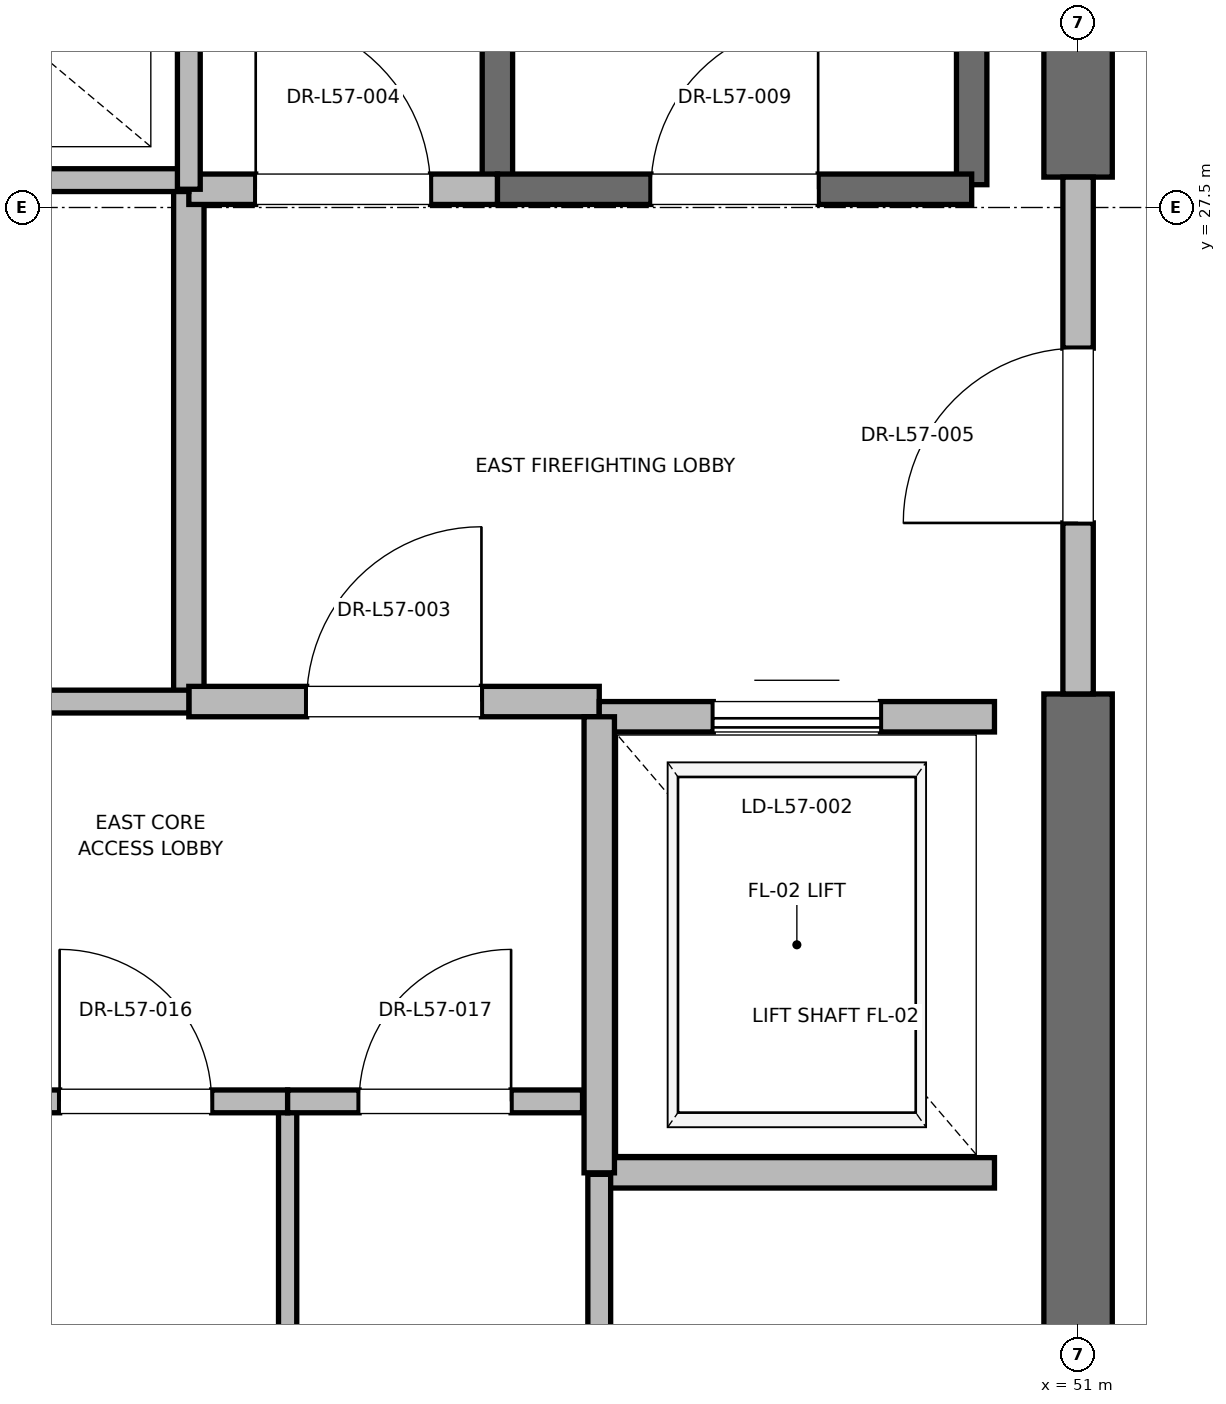
"""IFC4 building model, lengths in metres.
Left out: names, types, materials, properties, quantities, classifications, styles, units other than length and angle.
Written with IfcOpenShell. Run it as: python <this file> out.ifc"""

import sys

from ifc_helpers import new_model, si_unit, direction, frame, frame_2d, origin, place, context, subcontext, project, spatial, rectangle, extrude, element, fill, save


model = new_model("IFC4")
c1 = context("Model", 3, precision=1e-05, world=origin(), true_north=direction((0.0, 1.0)))
c2 = subcontext(c1, "Body", "Model", "MODEL_VIEW")
j1 = project(units=[si_unit("LENGTHUNIT", "METRE"), si_unit("PLANEANGLEUNIT", "RADIAN")], contexts=[c1])
p1 = place(None, origin())
s1 = spatial("IfcSite", under=j1, at=p1, CompositionType="ELEMENT")
p2 = place(p1, origin())
s2 = spatial("IfcBuilding", under=s1, at=p2, CompositionType="ELEMENT")
p3 = place(p2, frame((0.0, 0.0, 247.2)))
s3 = spatial("IfcBuildingStorey", under=s2, at=p3, CompositionType="ELEMENT", Elevation=247.2)
p4 = place(p3, frame((51.0, 18.5, 0.0), z_axis=(0.0, 0.0, 1.0), x_axis=(0.0, 1.0, 0.0)))
e1 = element("IfcWall", 1, at=p4, inside=s3, PredefinedType="SHEAR", context=c2, shape_type="SweptSolid", body=[
    extrude(rectangle(XDim=5.8, YDim=0.45, at=frame_2d((2.9, 0.0))), origin(), (0.0, 0.0, 1.0), 3.785),
])
p5 = place(p3, frame((51.0, 27.7, 0.0), z_axis=(0.0, 0.0, 1.0), x_axis=(0.0, 1.0, 0.0)))
e2 = element("IfcWall", 2, at=p5, inside=s3, PredefinedType="SHEAR", context=c2, shape_type="SweptSolid", body=[
    extrude(rectangle(XDim=8.8, YDim=0.45, at=frame_2d((4.4, 0.0))), origin(), (0.0, 0.0, 1.0), 3.785),
])
p6 = place(p3, frame((50.3, 27.65, 0.0), z_axis=(0.0, 0.0, 1.0), x_axis=(0.0, 1.0, 0.0)))
e3 = element("IfcWall", 3, at=p6, inside=s3, PredefinedType="SOLIDWALL", context=c2, shape_type="SweptSolid", body=[
    extrude(rectangle(XDim=8.15, YDim=0.2, at=frame_2d((4.075, 0.0))), origin(), (0.0, 0.0, 1.0), 3.785),
])
p7 = place(p3, frame((47.18, 27.62, 0.0), z_axis=(0.0, 0.0, 1.0), x_axis=(0.0, 1.0, 0.0)))
e4 = element("IfcWall", 4, at=p7, inside=s3, PredefinedType="SOLIDWALL", context=c2, shape_type="SweptSolid", body=[
    extrude(rectangle(XDim=8.18, YDim=0.2, at=frame_2d((4.09, 0.0))), origin(), (0.0, 0.0, 1.0), 3.785),
])
p8 = place(p3, frame((47.18, 27.62, 0.0), z_axis=(0.0, 0.0, 1.0), x_axis=(1.0, 0.0, 0.0)))
e5 = element("IfcWall", 5, at=p8, inside=s3, PredefinedType="SOLIDWALL", context=c2, shape_type="SweptSolid", body=[
    extrude(rectangle(XDim=3.12, YDim=0.2, at=frame_2d((1.56, 0.0))), origin(), (0.0, 0.0, 1.0), 3.785),
])
p9 = place(p8, frame((1.01, 0.0, 0.0)))
e6 = element("IfcOpeningElement", 6, at=p9, cuts=e5, PredefinedType="OPENING", context=c2, shape_type="SweptSolid", body=[
    extrude(rectangle(XDim=1.1, YDim=2.15, at=frame_2d((0.55, 1.075))), frame((0.0, 0.1, 0.0), z_axis=(0.0, -1.0, 0.0), x_axis=(1.0, 0.0, 0.0)), (0.0, 0.0, 1.0), 0.2),
])
p10 = place(p3, frame((45.15, 24.25, 0.0), z_axis=(0.0, 0.0, 1.0), x_axis=(0.0, 1.0, 0.0)))
e7 = element("IfcWall", 7, at=p10, inside=s3, PredefinedType="PARTITIONING", context=c2, shape_type="SweptSolid", body=[
    extrude(rectangle(XDim=3.37, YDim=0.2, at=frame_2d((1.685, 0.0))), origin(), (0.0, 0.0, 1.0), 3.785),
])
p11 = place(p3, frame((45.15, 24.25, 0.0), z_axis=(0.0, 0.0, 1.0), x_axis=(1.0, 0.0, 0.0)))
e8 = element("IfcWall", 8, at=p11, inside=s3, PredefinedType="PARTITIONING", context=c2, shape_type="SweptSolid", body=[
    extrude(rectangle(XDim=2.7, YDim=0.2, at=frame_2d((1.35, 0.0))), origin(), (0.0, 0.0, 1.0), 3.785),
])
p12 = place(p11, frame((0.775, 0.0, 0.0)))
e9 = element("IfcOpeningElement", 9, at=p12, cuts=e8, PredefinedType="OPENING", context=c2, shape_type="SweptSolid", body=[
    extrude(rectangle(XDim=1.15, YDim=2.2, at=frame_2d((0.575, 1.1))), frame((0.0, 0.1, 0.0), z_axis=(0.0, -1.0, 0.0), x_axis=(1.0, 0.0, 0.0)), (0.0, 0.0, 1.0), 0.2),
])
p13 = place(p3, frame((45.15, 27.62, 0.0), z_axis=(0.0, 0.0, 1.0), x_axis=(1.0, 0.0, 0.0)))
e10 = element("IfcWall", 10, at=p13, inside=s3, PredefinedType="PARTITIONING", context=c2, shape_type="SweptSolid", body=[
    extrude(rectangle(XDim=2.03, YDim=0.2, at=frame_2d((1.015, 0.0))), origin(), (0.0, 0.0, 1.0), 3.785),
])
p14 = place(p13, frame((0.44, 0.0, 0.0)))
e11 = element("IfcOpeningElement", 11, at=p14, cuts=e10, PredefinedType="OPENING", context=c2, shape_type="SweptSolid", body=[
    extrude(rectangle(XDim=1.15, YDim=2.2, at=frame_2d((0.575, 1.1))), frame((0.0, 0.1, 0.0), z_axis=(0.0, -1.0, 0.0), x_axis=(1.0, 0.0, 0.0)), (0.0, 0.0, 1.0), 0.2),
])
p15 = place(p3, frame((51.0, 24.3, 0.0), z_axis=(0.0, 0.0, 1.0), x_axis=(0.0, 1.0, 0.0)))
e12 = element("IfcWall", 12, at=p15, inside=s3, PredefinedType="PARTITIONING", context=c2, shape_type="SweptSolid", body=[
    extrude(rectangle(XDim=3.4, YDim=0.2, at=frame_2d((1.7, 0.0))), origin(), (0.0, 0.0, 1.0), 2.865),
])
p16 = place(p15, frame((1.125, 0.0, 0.0)))
e13 = element("IfcOpeningElement", 13, at=p16, cuts=e12, PredefinedType="OPENING", context=c2, shape_type="SweptSolid", body=[
    extrude(rectangle(XDim=1.15, YDim=2.2, at=frame_2d((0.575, 1.1))), frame((0.0, 0.1, 0.0), z_axis=(0.0, -1.0, 0.0), x_axis=(1.0, 0.0, 0.0)), (0.0, 0.0, 1.0), 0.2),
])
p17 = place(p3, frame((47.85, 21.15, 0.0), z_axis=(0.0, 0.0, 1.0), x_axis=(1.0, 0.0, 0.0)))
e14 = element("IfcWall", 14, at=p17, inside=s3, PredefinedType="SOLIDWALL", context=c2, shape_type="SweptSolid", body=[
    extrude(rectangle(XDim=2.6, YDim=0.2, at=frame_2d((1.3, 0.0))), origin(), (0.0, 0.0, 1.0), 3.785),
])
p18 = place(p3, frame((50.45, 24.15, 0.0), z_axis=(0.0, 0.0, 1.0), x_axis=(-1.0, 0.0, 0.0)))
e15 = element("IfcWall", 15, at=p18, inside=s3, PredefinedType="SOLIDWALL", context=c2, shape_type="SweptSolid", body=[
    extrude(rectangle(XDim=2.6, YDim=0.2, at=frame_2d((1.3, 0.0))), origin(), (0.0, 0.0, 1.0), 2.865),
])
p19 = place(p18, frame((0.75, 0.0, 0.0)))
e16 = element("IfcOpeningElement", 16, at=p19, cuts=e15, PredefinedType="OPENING", context=c2, shape_type="SweptSolid", body=[
    extrude(rectangle(XDim=1.1, YDim=2.2, at=frame_2d((0.55, 1.1))), frame((0.0, 0.1, 0.0), z_axis=(0.0, -1.0, 0.0), x_axis=(1.0, 0.0, 0.0)), (0.0, 0.0, 1.0), 0.2),
])
p20 = place(p3, frame((47.85, 24.15, 0.0), z_axis=(0.0, 0.0, 1.0), x_axis=(0.0, -1.0, 0.0)))
e17 = element("IfcWall", 17, at=p20, inside=s3, PredefinedType="SOLIDWALL", context=c2, shape_type="SweptSolid", body=[
    extrude(rectangle(XDim=3.0, YDim=0.2, at=frame_2d((1.5, 0.0))), origin(), (0.0, 0.0, 1.0), 3.785),
])
p21 = place(p3, frame((41.56, 27.68, 0.0), z_axis=(0.0, 0.0, 1.0), x_axis=(1.0, 0.0, 0.0)))
e18 = element("IfcWall", 18, at=p21, inside=s3, PredefinedType="PARTITIONING", context=c2, shape_type="SweptSolid", body=[
    extrude(rectangle(XDim=3.59, YDim=0.15, at=frame_2d((1.795, 0.0))), origin(), (0.0, 0.0, 1.0), 2.85),
])
p22 = place(p3, frame((47.85, 18.6, 0.0), z_axis=(0.0, 0.0, 1.0), x_axis=(0.0, 1.0, 0.0)))
e19 = element("IfcWall", 19, at=p22, inside=s3, PredefinedType="PARTITIONING", context=c2, shape_type="SweptSolid", body=[
    extrude(rectangle(XDim=2.54, YDim=0.15, at=frame_2d((1.27, 0.0))), origin(), (0.0, 0.0, 1.0), 2.85),
])
p23 = place(p3, frame((45.8, 18.6, 0.0), z_axis=(0.0, 0.0, 1.0), x_axis=(0.0, 1.0, 0.0)))
e20 = element("IfcWall", 20, at=p23, inside=s3, PredefinedType="PARTITIONING", context=c2, shape_type="SweptSolid", body=[
    extrude(rectangle(XDim=3.02, YDim=0.12, at=frame_2d((1.51, 0.0))), origin(), (0.0, 0.0, 1.0), 2.85),
])
p24 = place(p3, frame((43.8, 21.62, 0.0), z_axis=(0.0, 0.0, 1.0), x_axis=(1.0, 0.0, 0.0)))
e21 = element("IfcWall", 21, at=p24, inside=s3, PredefinedType="PARTITIONING", context=c2, shape_type="SweptSolid", body=[
    extrude(rectangle(XDim=2.0, YDim=0.15, at=frame_2d((1.0, 0.0))), origin(), (0.0, 0.0, 1.0), 2.85),
])
p25 = place(p24, frame((0.5, 0.0, 0.0)))
e22 = element("IfcOpeningElement", 22, at=p25, cuts=e21, PredefinedType="OPENING", context=c2, shape_type="SweptSolid", body=[
    extrude(rectangle(XDim=1.0, YDim=2.15, at=frame_2d((0.5, 1.075))), frame((0.0, 0.075, 0.0), z_axis=(0.0, -1.0, 0.0), x_axis=(1.0, 0.0, 0.0)), (0.0, 0.0, 1.0), 0.15),
])
p26 = place(p3, frame((45.8, 21.62, 0.0), z_axis=(0.0, 0.0, 1.0), x_axis=(1.0, 0.0, 0.0)))
e23 = element("IfcWall", 23, at=p26, inside=s3, PredefinedType="PARTITIONING", context=c2, shape_type="SweptSolid", body=[
    extrude(rectangle(XDim=1.94, YDim=0.15, at=frame_2d((0.97, 0.0))), origin(), (0.0, 0.0, 1.0), 2.85),
])
p27 = place(p26, frame((0.47, 0.0, 0.0)))
e24 = element("IfcOpeningElement", 24, at=p27, cuts=e23, PredefinedType="OPENING", context=c2, shape_type="SweptSolid", body=[
    extrude(rectangle(XDim=1.0, YDim=2.15, at=frame_2d((0.5, 1.075))), frame((0.0, 0.075, 0.0), z_axis=(0.0, -1.0, 0.0), x_axis=(1.0, 0.0, 0.0)), (0.0, 0.0, 1.0), 0.15),
])
p28 = place(p3, frame((41.76, 24.25, 0.0), z_axis=(0.0, 0.0, 1.0), x_axis=(1.0, 0.0, 0.0)))
e25 = element("IfcWall", 25, at=p28, inside=s3, PredefinedType="PARTITIONING", context=c2, shape_type="SweptSolid", body=[
    extrude(rectangle(XDim=3.39, YDim=0.15, at=frame_2d((1.695, 0.0))), origin(), (0.0, 0.0, 1.0), 2.85),
])
p29 = place(p28, frame((1.255, 0.0, 0.0)))
e26 = element("IfcOpeningElement", 26, at=p29, cuts=e25, PredefinedType="OPENING", context=c2, shape_type="SweptSolid", body=[
    extrude(rectangle(XDim=0.88, YDim=2.1, at=frame_2d((0.44, 1.05))), frame((0.0, 0.075, 0.0), z_axis=(0.0, -1.0, 0.0), x_axis=(1.0, 0.0, 0.0)), (0.0, 0.0, 1.0), 0.15),
])
p30 = place(p3, frame((45.15, 27.62, 0.0), z_axis=(0.0, 0.0, 1.0), x_axis=(0.0, 1.0, 0.0)))
e27 = element("IfcWall", 27, at=p30, inside=s3, PredefinedType="PARTITIONING", context=c2, shape_type="SweptSolid", body=[
    extrude(rectangle(XDim=3.1, YDim=0.15, at=frame_2d((1.55, 0.0))), origin(), (0.0, 0.0, 1.0), 2.85),
])
p31 = place(p9, origin())
e28 = element("IfcDoor", 28, at=p31, inside=s3, OperationType="SINGLE_SWING_RIGHT", PredefinedType="DOOR", context=c2, shape_type="SweptSolid", body=[
    extrude(rectangle(XDim=1.1, YDim=2.15, at=frame_2d((0.55, 1.075))), frame((0.0, 0.025, 0.0), z_axis=(0.0, -1.0, 0.0), x_axis=(1.0, 0.0, 0.0)), (0.0, 0.0, 1.0), 0.05),
])
fill(e6, e28)
p32 = place(p12, origin())
e29 = element("IfcDoor", 29, at=p32, inside=s3, OperationType="SINGLE_SWING_RIGHT", PredefinedType="DOOR", context=c2, shape_type="SweptSolid", body=[
    extrude(rectangle(XDim=1.15, YDim=2.2, at=frame_2d((0.575, 1.1))), frame((0.0, 0.025, 0.0), z_axis=(0.0, -1.0, 0.0), x_axis=(1.0, 0.0, 0.0)), (0.0, 0.0, 1.0), 0.05),
])
fill(e9, e29)
p33 = place(p14, origin())
e30 = element("IfcDoor", 30, at=p33, inside=s3, OperationType="SINGLE_SWING_LEFT", PredefinedType="DOOR", context=c2, shape_type="SweptSolid", body=[
    extrude(rectangle(XDim=1.15, YDim=2.2, at=frame_2d((0.575, 1.1))), frame((0.0, 0.025, 0.0), z_axis=(0.0, -1.0, 0.0), x_axis=(1.0, 0.0, 0.0)), (0.0, 0.0, 1.0), 0.05),
])
fill(e11, e30)
p34 = place(p16, origin())
e31 = element("IfcDoor", 31, at=p34, inside=s3, OperationType="SINGLE_SWING_LEFT", PredefinedType="DOOR", context=c2, shape_type="SweptSolid", body=[
    extrude(rectangle(XDim=1.15, YDim=2.2, at=frame_2d((0.575, 1.1))), frame((0.0, 0.025, 0.0), z_axis=(0.0, -1.0, 0.0), x_axis=(1.0, 0.0, 0.0)), (0.0, 0.0, 1.0), 0.05),
])
fill(e13, e31)
p35 = place(p19, origin())
e32 = element("IfcDoor", 32, at=p35, inside=s3, OperationType="SLIDING_TO_RIGHT", PredefinedType="DOOR", context=c2, shape_type="SweptSolid", body=[
    extrude(rectangle(XDim=1.1, YDim=2.2, at=frame_2d((0.55, 1.1))), frame((0.0, 0.025, 0.0), z_axis=(0.0, -1.0, 0.0), x_axis=(1.0, 0.0, 0.0)), (0.0, 0.0, 1.0), 0.05),
])
fill(e16, e32)
p36 = place(p25, origin())
e33 = element("IfcDoor", 33, at=p36, inside=s3, OperationType="SINGLE_SWING_LEFT", PredefinedType="DOOR", context=c2, shape_type="SweptSolid", body=[
    extrude(rectangle(XDim=1.0, YDim=2.15, at=frame_2d((0.5, 1.075))), frame((0.0, 0.025, 0.0), z_axis=(0.0, -1.0, 0.0), x_axis=(1.0, 0.0, 0.0)), (0.0, 0.0, 1.0), 0.05),
])
fill(e22, e33)
p37 = place(p27, origin())
e34 = element("IfcDoor", 34, at=p37, inside=s3, OperationType="SINGLE_SWING_RIGHT", PredefinedType="DOOR", context=c2, shape_type="SweptSolid", body=[
    extrude(rectangle(XDim=1.0, YDim=2.15, at=frame_2d((0.5, 1.075))), frame((0.0, 0.025, 0.0), z_axis=(0.0, -1.0, 0.0), x_axis=(1.0, 0.0, 0.0)), (0.0, 0.0, 1.0), 0.05),
])
fill(e24, e34)
save(model, sys.argv[1])
